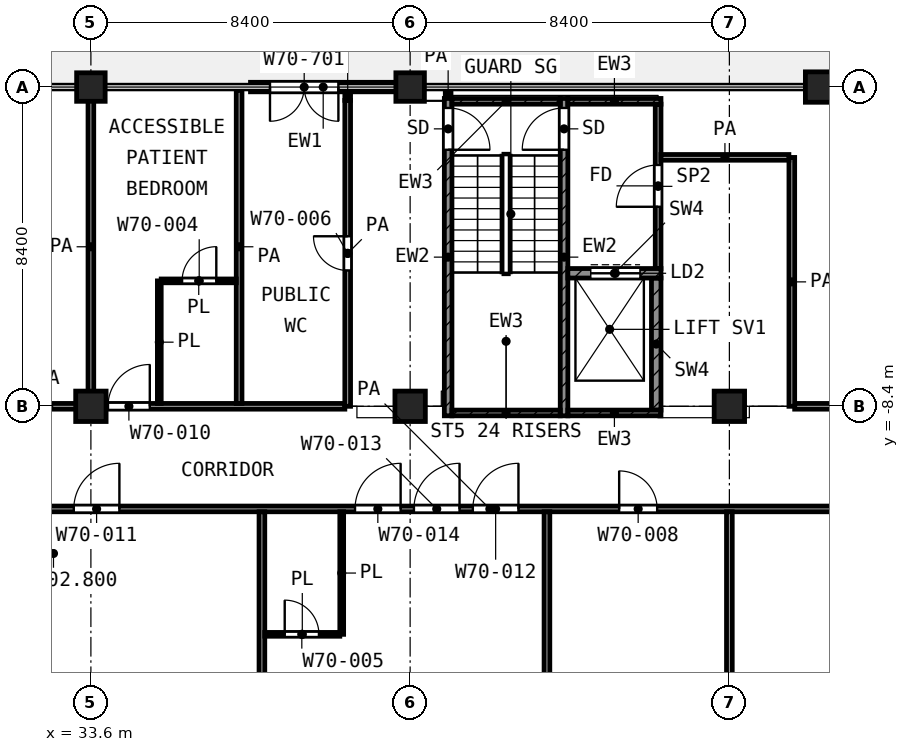
"""IFC4 building model, lengths in metres.
Left out: names, types, materials, properties, quantities, classifications, styles, units other than length and angle.
Written with IfcOpenShell. Run it as: python <this file> out.ifc"""

import sys

from ifc_helpers import new_model, si_unit, direction, frame, frame_2d, origin, origin_2d, place, context, subcontext, project, spatial, rectangle, extrude, element, fill, save


model = new_model("IFC4")
c1 = context("Model", 3, precision=1e-05, world=origin(), true_north=direction((0.0, 1.0)))
c2 = subcontext(c1, "Body", "Model", "MODEL_VIEW")
j1 = project(units=[si_unit("LENGTHUNIT", "METRE"), si_unit("PLANEANGLEUNIT", "RADIAN")], contexts=[c1])
p1 = place(None, origin())
s1 = spatial("IfcSite", under=j1, at=p1, CompositionType="ELEMENT")
p2 = place(p1, origin())
s2 = spatial("IfcBuilding", under=s1, at=p2, CompositionType="ELEMENT")
p3 = place(p2, frame((0.0, 0.0, 302.8)))
s3 = spatial("IfcBuildingStorey", under=s2, at=p3, CompositionType="ELEMENT", Elevation=302.8)
for number, where, z_axis, x_axis in (
    (1, (33.6, 0.0, 0.0), (0.0, 0.0, 1.0), (1.0, 0.0, 0.0)),
    (2, (42.0, 0.0, 0.0), (0.0, 0.0, 1.0), (1.0, 0.0, 0.0)),
):
    element("IfcColumn", number, at=place(p3, frame(where, z_axis=z_axis, x_axis=x_axis)), inside=s3, PredefinedType="COLUMN", context=c2, shape_type="SweptSolid", body=[
        extrude(rectangle(XDim=0.75, YDim=0.75, at=origin_2d()), origin(), (0.0, 0.0, 1.0), 4.2),
    ])
for number, where, z_axis, x_axis in (
    (3, (52.8, 0.0, 0.0), (0.0, 0.0, 1.0), (1.0, 0.0, 0.0)),
    (4, (33.6, -8.4, 0.0), (0.0, 0.0, 1.0), (1.0, 0.0, 0.0)),
    (5, (42.0, -8.4, 0.0), (0.0, 0.0, 1.0), (1.0, 0.0, 0.0)),
    (6, (50.4, -8.4, 0.0), (0.0, 0.0, 1.0), (1.0, 0.0, 0.0)),
):
    element("IfcColumn", number, at=place(p3, frame(where, z_axis=z_axis, x_axis=x_axis)), inside=s3, PredefinedType="COLUMN", context=c2, shape_type="SweptSolid", body=[
        extrude(rectangle(XDim=0.8, YDim=0.8, at=origin_2d()), origin(), (0.0, 0.0, 1.0), 4.2),
    ])
p4 = place(p3, frame((41.625, 0.0, 0.0), z_axis=(0.0, 0.0, 1.0), x_axis=(-1.0, 0.0, 0.0)))
e7 = element("IfcWall", 7, at=p4, inside=s3, PredefinedType="SOLIDWALL", context=c2, shape_type="SweptSolid", body=[
    extrude(rectangle(XDim=3.825, YDim=0.25, at=frame_2d((1.913, 0.0))), origin(), (0.0, 0.0, 1.0), 3.48),
])
p5 = place(p4, frame((1.512, 0.0, 0.0)))
e8 = element("IfcOpeningElement", 8, at=p5, cuts=e7, PredefinedType="OPENING", context=c2, shape_type="SweptSolid", body=[
    extrude(rectangle(XDim=1.8, YDim=2.1, at=frame_2d((0.9, 1.05))), frame((0.0, 0.135, 0.0), z_axis=(0.0, -1.0, 0.0), x_axis=(1.0, 0.0, 0.0)), (0.0, 0.0, 1.0), 0.27),
])
p6 = place(p3, frame((43.0, -8.65, 0.0), z_axis=(0.0, 0.0, 1.0), x_axis=(0.0, 1.0, 0.0)))
e9 = element("IfcWall", 9, at=p6, inside=s3, PredefinedType="SHEAR", context=c2, shape_type="SweptSolid", body=[
    extrude(rectangle(XDim=8.35, YDim=0.2, at=frame_2d((4.175, 0.0))), origin(), (0.0, 0.0, 1.0), 3.6),
])
p7 = place(p6, frame((7.0, 0.0, 0.0)))
e10 = element("IfcOpeningElement", 10, at=p7, cuts=e9, PredefinedType="OPENING", context=c2, shape_type="SweptSolid", body=[
    extrude(rectangle(XDim=1.1, YDim=2.1, at=frame_2d((0.55, 1.05))), frame((0.0, 0.11, 0.0), z_axis=(0.0, -1.0, 0.0), x_axis=(1.0, 0.0, 0.0)), (0.0, 0.0, 1.0), 0.22),
])
p8 = place(p3, frame((46.05, -8.65, 0.0), z_axis=(0.0, 0.0, 1.0), x_axis=(0.0, 1.0, 0.0)))
e11 = element("IfcWall", 11, at=p8, inside=s3, PredefinedType="SHEAR", context=c2, shape_type="SweptSolid", body=[
    extrude(rectangle(XDim=8.35, YDim=0.2, at=frame_2d((4.175, 0.0))), origin(), (0.0, 0.0, 1.0), 3.6),
])
p9 = place(p8, frame((7.0, 0.0, 0.0)))
e12 = element("IfcOpeningElement", 12, at=p9, cuts=e11, PredefinedType="OPENING", context=c2, shape_type="SweptSolid", body=[
    extrude(rectangle(XDim=1.1, YDim=2.1, at=frame_2d((0.55, 1.05))), frame((0.0, 0.11, 0.0), z_axis=(0.0, -1.0, 0.0), x_axis=(1.0, 0.0, 0.0)), (0.0, 0.0, 1.0), 0.22),
])
p10 = place(p3, frame((43.1, -0.375, 0.0), z_axis=(0.0, 0.0, 1.0), x_axis=(1.0, 0.0, 0.0)))
e13 = element("IfcWall", 13, at=p10, inside=s3, PredefinedType="SHEAR", context=c2, shape_type="SweptSolid", body=[
    extrude(rectangle(XDim=2.85, YDim=0.15, at=frame_2d((1.425, 0.0))), origin(), (0.0, 0.0, 1.0), 3.6),
])
p11 = place(p3, frame((46.15, -0.375, 0.0), z_axis=(0.0, 0.0, 1.0), x_axis=(1.0, 0.0, 0.0)))
e14 = element("IfcWall", 14, at=p11, inside=s3, PredefinedType="SHEAR", context=c2, shape_type="SweptSolid", body=[
    extrude(rectangle(XDim=2.45, YDim=0.15, at=frame_2d((1.225, 0.0))), origin(), (0.0, 0.0, 1.0), 3.6),
])
p12 = place(p3, frame((43.1, -8.575, 0.0), z_axis=(0.0, 0.0, 1.0), x_axis=(1.0, 0.0, 0.0)))
e15 = element("IfcWall", 15, at=p12, inside=s3, PredefinedType="SHEAR", context=c2, shape_type="SweptSolid", body=[
    extrude(rectangle(XDim=2.85, YDim=0.15, at=frame_2d((1.425, 0.0))), origin(), (0.0, 0.0, 1.0), 3.6),
])
p13 = place(p3, frame((46.15, -8.575, 0.0), z_axis=(0.0, 0.0, 1.0), x_axis=(1.0, 0.0, 0.0)))
e16 = element("IfcWall", 16, at=p13, inside=s3, PredefinedType="SHEAR", context=c2, shape_type="SweptSolid", body=[
    extrude(rectangle(XDim=2.45, YDim=0.15, at=frame_2d((1.225, 0.0))), origin(), (0.0, 0.0, 1.0), 3.6),
])
p14 = place(p3, frame((46.15, -4.9, 0.0), z_axis=(0.0, 0.0, 1.0), x_axis=(1.0, 0.0, 0.0)))
e17 = element("IfcWall", 17, at=p14, inside=s3, PredefinedType="SHEAR", context=c2, shape_type="SweptSolid", body=[
    extrude(rectangle(XDim=2.45, YDim=0.25, at=frame_2d((1.225, 0.0))), origin(), (0.0, 0.0, 1.0), 3.6),
])
p15 = place(p14, frame((0.6, 0.0, 0.0)))
e18 = element("IfcOpeningElement", 18, at=p15, cuts=e17, PredefinedType="OPENING", context=c2, shape_type="SweptSolid", body=[
    extrude(rectangle(XDim=1.3, YDim=2.1, at=frame_2d((0.65, 1.05))), frame((0.0, 0.135, 0.0), z_axis=(0.0, -1.0, 0.0), x_axis=(1.0, 0.0, 0.0)), (0.0, 0.0, 1.0), 0.27),
])
p16 = place(p3, frame((48.475, -8.5, 0.0), z_axis=(0.0, 0.0, 1.0), x_axis=(0.0, 1.0, 0.0)))
e19 = element("IfcWall", 19, at=p16, inside=s3, PredefinedType="SHEAR", context=c2, shape_type="SweptSolid", body=[
    extrude(rectangle(XDim=3.475, YDim=0.25, at=frame_2d((1.738, 0.0))), origin(), (0.0, 0.0, 1.0), 3.6),
])
p17 = place(p3, frame((48.525, -4.775, 0.0), z_axis=(0.0, 0.0, 1.0), x_axis=(0.0, 1.0, 0.0)))
e20 = element("IfcWall", 20, at=p17, inside=s3, PredefinedType="PARTITIONING", context=c2, shape_type="SweptSolid", body=[
    extrude(rectangle(XDim=4.325, YDim=0.15, at=frame_2d((2.163, 0.0))), origin(), (0.0, 0.0, 1.0), 3.6),
])
p18 = place(p17, frame((1.625, 0.0, 0.0)))
e21 = element("IfcOpeningElement", 21, at=p18, cuts=e20, PredefinedType="OPENING", context=c2, shape_type="SweptSolid", body=[
    extrude(rectangle(XDim=1.1, YDim=2.1, at=frame_2d((0.55, 1.05))), frame((0.0, 0.085, 0.0), z_axis=(0.0, -1.0, 0.0), x_axis=(1.0, 0.0, 0.0)), (0.0, 0.0, 1.0), 0.17),
])
p19 = place(p3, frame((38.175, -14.4, 0.0), z_axis=(0.0, 0.0, 1.0), x_axis=(1.0, 0.0, 0.0)))
e22 = element("IfcWall", 22, at=p19, inside=s3, PredefinedType="PARTITIONING", context=c2, shape_type="SweptSolid", body=[
    extrude(rectangle(XDim=1.975, YDim=0.1, at=frame_2d((0.987, 0.0))), origin(), (0.0, 0.0, 1.0), 3.6),
])
p20 = place(p19, frame((0.525, 0.0, 0.0)))
e23 = element("IfcOpeningElement", 23, at=p20, cuts=e22, PredefinedType="OPENING", context=c2, shape_type="SweptSolid", body=[
    extrude(rectangle(XDim=0.9, YDim=2.1, at=frame_2d((0.45, 1.05))), frame((0.0, 0.06, 0.0), z_axis=(0.0, -1.0, 0.0), x_axis=(1.0, 0.0, 0.0)), (0.0, 0.0, 1.0), 0.12),
])
p21 = place(p3, frame((35.45, -5.1, 0.0), z_axis=(0.0, 0.0, 1.0), x_axis=(1.0, 0.0, 0.0)))
e24 = element("IfcWall", 24, at=p21, inside=s3, PredefinedType="PARTITIONING", context=c2, shape_type="SweptSolid", body=[
    extrude(rectangle(XDim=1.975, YDim=0.1, at=frame_2d((0.988, 0.0))), origin(), (0.0, 0.0, 1.0), 3.6),
])
p22 = place(p21, frame((0.55, 0.0, 0.0)))
e25 = element("IfcOpeningElement", 25, at=p22, cuts=e24, PredefinedType="OPENING", context=c2, shape_type="SweptSolid", body=[
    extrude(rectangle(XDim=0.9, YDim=2.1, at=frame_2d((0.45, 1.05))), frame((0.0, 0.06, 0.0), z_axis=(0.0, -1.0, 0.0), x_axis=(1.0, 0.0, 0.0)), (0.0, 0.0, 1.0), 0.12),
])
for number, where, z_axis, x_axis in (
    (26, (35.4, -8.325, 0.0), (0.0, 0.0, 1.0), (0.0, 1.0, 0.0)),
    (27, (40.2, -14.4, 0.0), (0.0, 0.0, 1.0), (0.0, 1.0, 0.0)),
):
    element("IfcWall", number, at=place(p3, frame(where, z_axis=z_axis, x_axis=x_axis)), inside=s3, PredefinedType="PARTITIONING", context=c2, shape_type="SweptSolid", body=[
        extrude(rectangle(XDim=3.225, YDim=0.1, at=frame_2d((1.612, 0.0))), origin(), (0.0, 0.0, 1.0), 3.6),
    ])
p23 = place(p3, frame((29.475, -11.1, 0.0), z_axis=(0.0, 0.0, 1.0), x_axis=(1.0, 0.0, 0.0)))
e28 = element("IfcWall", 28, at=p23, inside=s3, PredefinedType="PARTITIONING", context=c2, shape_type="SweptSolid", body=[
    extrude(rectangle(XDim=29.245, YDim=0.15, at=frame_2d((14.623, 0.0))), origin(), (0.0, 0.0, 1.0), 3.6),
])
p24 = place(p23, frame((3.675, 0.0, 0.0)))
e29 = element("IfcOpeningElement", 29, at=p24, cuts=e28, PredefinedType="OPENING", context=c2, shape_type="SweptSolid", body=[
    extrude(rectangle(XDim=1.2, YDim=2.1, at=frame_2d((0.6, 1.05))), frame((0.0, 0.085, 0.0), z_axis=(0.0, -1.0, 0.0), x_axis=(1.0, 0.0, 0.0)), (0.0, 0.0, 1.0), 0.17),
])
p25 = place(p23, frame((14.175, 0.0, 0.0)))
e30 = element("IfcOpeningElement", 30, at=p25, cuts=e28, PredefinedType="OPENING", context=c2, shape_type="SweptSolid", body=[
    extrude(rectangle(XDim=1.2, YDim=2.1, at=frame_2d((0.6, 1.05))), frame((0.0, 0.085, 0.0), z_axis=(0.0, -1.0, 0.0), x_axis=(1.0, 0.0, 0.0)), (0.0, 0.0, 1.0), 0.17),
])
p26 = place(p23, frame((12.625, 0.0, 0.0)))
e31 = element("IfcOpeningElement", 31, at=p26, cuts=e28, PredefinedType="OPENING", context=c2, shape_type="SweptSolid", body=[
    extrude(rectangle(XDim=1.2, YDim=2.1, at=frame_2d((0.6, 1.05))), frame((0.0, 0.085, 0.0), z_axis=(0.0, -1.0, 0.0), x_axis=(1.0, 0.0, 0.0)), (0.0, 0.0, 1.0), 0.17),
])
p27 = place(p23, frame((11.075, 0.0, 0.0)))
e32 = element("IfcOpeningElement", 32, at=p27, cuts=e28, PredefinedType="OPENING", context=c2, shape_type="SweptSolid", body=[
    extrude(rectangle(XDim=1.2, YDim=2.1, at=frame_2d((0.6, 1.05))), frame((0.0, 0.085, 0.0), z_axis=(0.0, -1.0, 0.0), x_axis=(1.0, 0.0, 0.0)), (0.0, 0.0, 1.0), 0.17),
])
p28 = place(p23, frame((18.025, 0.0, 0.0)))
e33 = element("IfcOpeningElement", 33, at=p28, cuts=e28, PredefinedType="OPENING", context=c2, shape_type="SweptSolid", body=[
    extrude(rectangle(XDim=1.0, YDim=2.1, at=frame_2d((0.5, 1.05))), frame((0.0, 0.085, 0.0), z_axis=(0.0, -1.0, 0.0), x_axis=(1.0, 0.0, 0.0)), (0.0, 0.0, 1.0), 0.17),
])
p29 = place(p23, frame((24.375, 0.0, 0.0)))
e34 = element("IfcOpeningElement", 34, at=p29, cuts=e28, PredefinedType="OPENING", context=c2, shape_type="SweptSolid", body=[
    extrude(rectangle(XDim=1.5, YDim=2.1, at=frame_2d((0.75, 1.05))), frame((0.0, 0.085, 0.0), z_axis=(0.0, -1.0, 0.0), x_axis=(1.0, 0.0, 0.0)), (0.0, 0.0, 1.0), 0.17),
])
p30 = place(p3, frame((24.7, -8.4, 0.0), z_axis=(0.0, 0.0, 1.0), x_axis=(1.0, 0.0, 0.0)))
e35 = element("IfcWall", 35, at=p30, inside=s3, PredefinedType="PARTITIONING", context=c2, shape_type="SweptSolid", body=[
    extrude(rectangle(XDim=15.582, YDim=0.15, at=frame_2d((7.791, 0.0))), origin(), (0.0, 0.0, 1.0), 3.6),
])
p31 = place(p30, frame((9.35, 0.0, 0.0)))
e36 = element("IfcOpeningElement", 36, at=p31, cuts=e35, PredefinedType="OPENING", context=c2, shape_type="SweptSolid", body=[
    extrude(rectangle(XDim=1.1, YDim=2.1, at=frame_2d((0.55, 1.05))), frame((0.0, 0.085, 0.0), z_axis=(0.0, -1.0, 0.0), x_axis=(1.0, 0.0, 0.0)), (0.0, 0.0, 1.0), 0.17),
])
p32 = place(p30, frame((1.05, 0.0, 0.0)))
e37 = element("IfcOpeningElement", 37, at=p32, cuts=e35, PredefinedType="OPENING", context=c2, shape_type="SweptSolid", body=[
    extrude(rectangle(XDim=1.0, YDim=2.1, at=frame_2d((0.5, 1.05))), frame((0.0, 0.085, 0.0), z_axis=(0.0, -1.0, 0.0), x_axis=(1.0, 0.0, 0.0)), (0.0, 0.0, 1.0), 0.17),
])
p33 = place(p30, frame((5.15, 0.0, 0.0)))
e38 = element("IfcOpeningElement", 38, at=p33, cuts=e35, PredefinedType="OPENING", context=c2, shape_type="SweptSolid", body=[
    extrude(rectangle(XDim=1.2, YDim=2.1, at=frame_2d((0.6, 1.05))), frame((0.0, 0.085, 0.0), z_axis=(0.0, -1.0, 0.0), x_axis=(1.0, 0.0, 0.0)), (0.0, 0.0, 1.0), 0.17),
])
p34 = place(p3, frame((52.118, -8.4, 0.0), z_axis=(0.0, 0.0, 1.0), x_axis=(1.0, 0.0, 0.0)))
e39 = element("IfcWall", 39, at=p34, inside=s3, PredefinedType="PARTITIONING", context=c2, shape_type="SweptSolid", body=[
    extrude(rectangle(XDim=6.602, YDim=0.15, at=frame_2d((3.301, 0.0))), origin(), (0.0, 0.0, 1.0), 3.6),
])
p35 = place(p34, frame((2.553, 0.0, 0.0)))
e40 = element("IfcOpeningElement", 40, at=p35, cuts=e39, PredefinedType="OPENING", context=c2, shape_type="SweptSolid", body=[
    extrude(rectangle(XDim=1.5, YDim=2.1, at=frame_2d((0.75, 1.05))), frame((0.0, 0.085, 0.0), z_axis=(0.0, -1.0, 0.0), x_axis=(1.0, 0.0, 0.0)), (0.0, 0.0, 1.0), 0.17),
])
p36 = place(p3, frame((48.6, -1.85, 0.0), z_axis=(0.0, 0.0, 1.0), x_axis=(1.0, 0.0, 0.0)))
e41 = element("IfcWall", 41, at=p36, inside=s3, PredefinedType="PARTITIONING", context=c2, shape_type="SweptSolid", body=[
    extrude(rectangle(XDim=3.366, YDim=0.15, at=frame_2d((1.683, 0.0))), origin(), (0.0, 0.0, 1.0), 3.6),
])
for number, where, z_axis, x_axis in (
    (42, (33.6, -8.325, 0.0), (0.0, 0.0, 1.0), (0.0, 1.0, 0.0)),
    (43, (37.5, -8.325, 0.0), (0.0, 0.0, 1.0), (0.0, 1.0, 0.0)),
):
    element("IfcWall", number, at=place(p3, frame(where, z_axis=z_axis, x_axis=x_axis)), inside=s3, PredefinedType="PARTITIONING", context=c2, shape_type="SweptSolid", body=[
        extrude(rectangle(XDim=8.245, YDim=0.15, at=frame_2d((4.123, 0.0))), origin(), (0.0, 0.0, 1.0), 3.6),
    ])
p37 = place(p3, frame((38.1, -25.12, 0.0), z_axis=(0.0, 0.0, 1.0), x_axis=(0.0, 1.0, 0.0)))
e44 = element("IfcWall", 44, at=p37, inside=s3, PredefinedType="PARTITIONING", context=c2, shape_type="SweptSolid", body=[
    extrude(rectangle(XDim=13.945, YDim=0.15, at=frame_2d((6.973, 0.0))), origin(), (0.0, 0.0, 1.0), 3.6),
])
p38 = place(p3, frame((40.357, -8.4, 0.0), z_axis=(0.0, 0.0, 1.0), x_axis=(0.0, 1.0, 0.0)))
e45 = element("IfcWall", 45, at=p38, inside=s3, PredefinedType="PARTITIONING", context=c2, shape_type="SweptSolid", body=[
    extrude(rectangle(XDim=8.048, YDim=0.15, at=frame_2d((4.024, 0.0))), origin(), (0.0, 0.0, 1.0), 3.6),
])
p39 = place(p38, frame((3.574, 0.0, 0.0)))
e46 = element("IfcOpeningElement", 46, at=p39, cuts=e45, PredefinedType="OPENING", context=c2, shape_type="SweptSolid", body=[
    extrude(rectangle(XDim=0.9, YDim=2.1, at=frame_2d((0.45, 1.05))), frame((0.0, 0.085, 0.0), z_axis=(0.0, -1.0, 0.0), x_axis=(1.0, 0.0, 0.0)), (0.0, 0.0, 1.0), 0.17),
])
p40 = place(p3, frame((40.357, -0.35, 0.0), z_axis=(0.0, 0.0, 1.0), x_axis=(0.0, 1.0, 0.0)))
e47 = element("IfcWall", 47, at=p40, inside=s3, PredefinedType="PARTITIONING", context=c2, shape_type="SweptSolid", body=[
    extrude(rectangle(XDim=0.27, YDim=0.15, at=frame_2d((0.135, 0.0))), origin(), (0.0, 0.0, 1.0), 3.6),
])
p41 = place(p3, frame((43.0, -0.27, 0.0), z_axis=(0.0, 0.0, 1.0), x_axis=(0.0, 1.0, 0.0)))
e48 = element("IfcWall", 48, at=p41, inside=s3, PredefinedType="PARTITIONING", context=c2, shape_type="SweptSolid", body=[
    extrude(rectangle(XDim=0.19, YDim=0.15, at=frame_2d((0.095, 0.0))), origin(), (0.0, 0.0, 1.0), 3.6),
])
for number, where, z_axis, x_axis in (
    (49, (45.6, -25.12, 0.0), (0.0, 0.0, 1.0), (0.0, 1.0, 0.0)),
    (50, (50.4, -25.12, 0.0), (0.0, 0.0, 1.0), (0.0, 1.0, 0.0)),
):
    element("IfcWall", number, at=place(p3, frame(where, z_axis=z_axis, x_axis=x_axis)), inside=s3, PredefinedType="PARTITIONING", context=c2, shape_type="SweptSolid", body=[
        extrude(rectangle(XDim=13.945, YDim=0.15, at=frame_2d((6.973, 0.0))), origin(), (0.0, 0.0, 1.0), 3.6),
    ])
p42 = place(p3, frame((52.043, -8.4, 0.0), z_axis=(0.0, 0.0, 1.0), x_axis=(0.0, 1.0, 0.0)))
e51 = element("IfcWall", 51, at=p42, inside=s3, PredefinedType="PARTITIONING", context=c2, shape_type="SweptSolid", body=[
    extrude(rectangle(XDim=6.548, YDim=0.15, at=frame_2d((3.274, 0.0))), origin(), (0.0, 0.0, 1.0), 3.6),
])
p43 = place(p5, origin())
e52 = element("IfcDoor", 52, at=p43, inside=s3, OperationType="DOUBLE_DOOR_SINGLE_SWING", PredefinedType="DOOR", context=c2, shape_type="SweptSolid", body=[
    extrude(rectangle(XDim=1.8, YDim=2.1, at=frame_2d((0.9, 1.05))), frame((0.0, 0.025, 0.0), z_axis=(0.0, -1.0, 0.0), x_axis=(1.0, 0.0, 0.0)), (0.0, 0.0, 1.0), 0.05),
])
fill(e8, e52)
p44 = place(p7, frame((1.1, 0.0, 0.0), z_axis=(0.0, 0.0, 1.0), x_axis=(-1.0, 0.0, 0.0)))
e53 = element("IfcDoor", 53, at=p44, inside=s3, OperationType="SINGLE_SWING_LEFT", PredefinedType="DOOR", context=c2, shape_type="SweptSolid", body=[
    extrude(rectangle(XDim=1.1, YDim=2.1, at=frame_2d((0.55, 1.05))), frame((0.0, 0.025, 0.0), z_axis=(0.0, -1.0, 0.0), x_axis=(1.0, 0.0, 0.0)), (0.0, 0.0, 1.0), 0.05),
])
fill(e10, e53)
p45 = place(p9, origin())
e54 = element("IfcDoor", 54, at=p45, inside=s3, OperationType="SINGLE_SWING_LEFT", PredefinedType="DOOR", context=c2, shape_type="SweptSolid", body=[
    extrude(rectangle(XDim=1.1, YDim=2.1, at=frame_2d((0.55, 1.05))), frame((0.0, 0.025, 0.0), z_axis=(0.0, -1.0, 0.0), x_axis=(1.0, 0.0, 0.0)), (0.0, 0.0, 1.0), 0.05),
])
fill(e12, e54)
p46 = place(p15, origin())
e55 = element("IfcDoor", 55, at=p46, inside=s3, OperationType="DOUBLE_DOOR_SLIDING", PredefinedType="DOOR", context=c2, shape_type="SweptSolid", body=[
    extrude(rectangle(XDim=1.3, YDim=2.1, at=frame_2d((0.65, 1.05))), frame((0.0, 0.025, 0.0), z_axis=(0.0, -1.0, 0.0), x_axis=(1.0, 0.0, 0.0)), (0.0, 0.0, 1.0), 0.05),
])
fill(e18, e55)
p47 = place(p18, origin())
e56 = element("IfcDoor", 56, at=p47, inside=s3, OperationType="SINGLE_SWING_LEFT", PredefinedType="DOOR", context=c2, shape_type="SweptSolid", body=[
    extrude(rectangle(XDim=1.1, YDim=2.1, at=frame_2d((0.55, 1.05))), frame((0.0, 0.025, 0.0), z_axis=(0.0, -1.0, 0.0), x_axis=(1.0, 0.0, 0.0)), (0.0, 0.0, 1.0), 0.05),
])
fill(e21, e56)
p48 = place(p31, origin())
e57 = element("IfcDoor", 57, at=p48, inside=s3, OperationType="SINGLE_SWING_RIGHT", PredefinedType="DOOR", context=c2, shape_type="SweptSolid", body=[
    extrude(rectangle(XDim=1.1, YDim=2.1, at=frame_2d((0.55, 1.05))), frame((0.0, 0.025, 0.0), z_axis=(0.0, -1.0, 0.0), x_axis=(1.0, 0.0, 0.0)), (0.0, 0.0, 1.0), 0.05),
])
fill(e36, e57)
p49 = place(p22, origin())
e58 = element("IfcDoor", 58, at=p49, inside=s3, OperationType="SINGLE_SWING_RIGHT", PredefinedType="DOOR", context=c2, shape_type="SweptSolid", body=[
    extrude(rectangle(XDim=0.9, YDim=2.1, at=frame_2d((0.45, 1.05))), frame((0.0, 0.025, 0.0), z_axis=(0.0, -1.0, 0.0), x_axis=(1.0, 0.0, 0.0)), (0.0, 0.0, 1.0), 0.05),
])
fill(e25, e58)
p50 = place(p24, origin())
e59 = element("IfcDoor", 59, at=p50, inside=s3, OperationType="SINGLE_SWING_RIGHT", PredefinedType="DOOR", context=c2, shape_type="SweptSolid", body=[
    extrude(rectangle(XDim=1.2, YDim=2.1, at=frame_2d((0.6, 1.05))), frame((0.0, 0.025, 0.0), z_axis=(0.0, -1.0, 0.0), x_axis=(1.0, 0.0, 0.0)), (0.0, 0.0, 1.0), 0.05),
])
fill(e29, e59)
p51 = place(p25, origin())
e60 = element("IfcDoor", 60, at=p51, inside=s3, OperationType="SINGLE_SWING_RIGHT", PredefinedType="DOOR", context=c2, shape_type="SweptSolid", body=[
    extrude(rectangle(XDim=1.2, YDim=2.1, at=frame_2d((0.6, 1.05))), frame((0.0, 0.025, 0.0), z_axis=(0.0, -1.0, 0.0), x_axis=(1.0, 0.0, 0.0)), (0.0, 0.0, 1.0), 0.05),
])
fill(e30, e60)
p52 = place(p26, origin())
e61 = element("IfcDoor", 61, at=p52, inside=s3, OperationType="SINGLE_SWING_RIGHT", PredefinedType="DOOR", context=c2, shape_type="SweptSolid", body=[
    extrude(rectangle(XDim=1.2, YDim=2.1, at=frame_2d((0.6, 1.05))), frame((0.0, 0.025, 0.0), z_axis=(0.0, -1.0, 0.0), x_axis=(1.0, 0.0, 0.0)), (0.0, 0.0, 1.0), 0.05),
])
fill(e31, e61)
p53 = place(p27, origin())
e62 = element("IfcDoor", 62, at=p53, inside=s3, OperationType="SINGLE_SWING_RIGHT", PredefinedType="DOOR", context=c2, shape_type="SweptSolid", body=[
    extrude(rectangle(XDim=1.2, YDim=2.1, at=frame_2d((0.6, 1.05))), frame((0.0, 0.025, 0.0), z_axis=(0.0, -1.0, 0.0), x_axis=(1.0, 0.0, 0.0)), (0.0, 0.0, 1.0), 0.05),
])
fill(e32, e62)
p54 = place(p20, origin())
e63 = element("IfcDoor", 63, at=p54, inside=s3, OperationType="SINGLE_SWING_LEFT", PredefinedType="DOOR", context=c2, shape_type="SweptSolid", body=[
    extrude(rectangle(XDim=0.9, YDim=2.1, at=frame_2d((0.45, 1.05))), frame((0.0, 0.025, 0.0), z_axis=(0.0, -1.0, 0.0), x_axis=(1.0, 0.0, 0.0)), (0.0, 0.0, 1.0), 0.05),
])
fill(e23, e63)
p55 = place(p28, origin())
e64 = element("IfcDoor", 64, at=p55, inside=s3, OperationType="SINGLE_SWING_LEFT", PredefinedType="DOOR", context=c2, shape_type="SweptSolid", body=[
    extrude(rectangle(XDim=1.0, YDim=2.1, at=frame_2d((0.5, 1.05))), frame((0.0, 0.025, 0.0), z_axis=(0.0, -1.0, 0.0), x_axis=(1.0, 0.0, 0.0)), (0.0, 0.0, 1.0), 0.05),
])
fill(e33, e64)
p56 = place(p39, origin())
e65 = element("IfcDoor", 65, at=p56, inside=s3, OperationType="SINGLE_SWING_RIGHT", PredefinedType="DOOR", context=c2, shape_type="SweptSolid", body=[
    extrude(rectangle(XDim=0.9, YDim=2.1, at=frame_2d((0.45, 1.05))), frame((0.0, 0.025, 0.0), z_axis=(0.0, -1.0, 0.0), x_axis=(1.0, 0.0, 0.0)), (0.0, 0.0, 1.0), 0.05),
])
fill(e46, e65)
save(model, sys.argv[1])
